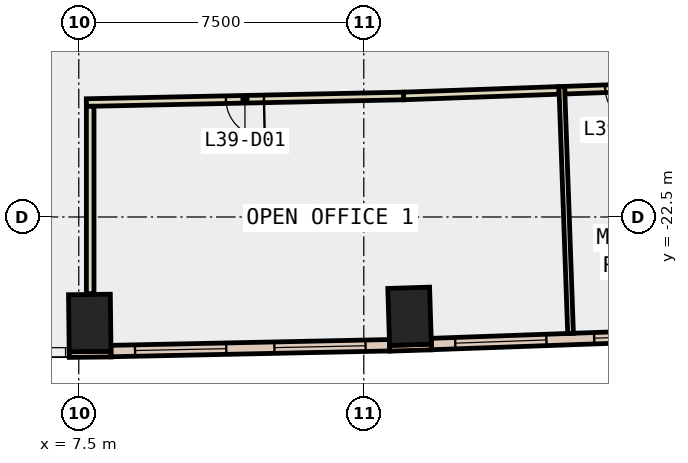
"""IFC4 building model, lengths in metres.
Left out: names, types, materials, properties, quantities, classifications, styles, units other than length and angle.
Written with IfcOpenShell. Run it as: python <this file> out.ifc"""

import sys

from ifc_helpers import new_model, si_unit, direction, frame, frame_2d, origin, origin_2d, place, context, subcontext, project, spatial, rectangle, extrude, element, fill, save


model = new_model("IFC4")
c1 = context("Model", 3, precision=1e-05, world=origin(), true_north=direction((0.0, 1.0)))
c2 = subcontext(c1, "Body", "Model", "MODEL_VIEW")
j1 = project(units=[si_unit("LENGTHUNIT", "METRE"), si_unit("PLANEANGLEUNIT", "RADIAN")], contexts=[c1])
p1 = place(None, origin())
s1 = spatial("IfcSite", under=j1, at=p1, CompositionType="ELEMENT")
p2 = place(p1, origin())
s2 = spatial("IfcBuilding", under=s1, at=p2, CompositionType="ELEMENT")
p3 = place(p2, frame((0.0, 0.0, 176.0)))
s3 = spatial("IfcBuildingStorey", under=s2, at=p3, CompositionType="ELEMENT", Elevation=176.0)
for number, where, z_axis, x_axis in (
    (1, (7.789, -25.289, -0.4), (0.0, 0.0, 1.0), (1.0, 0.012, 0.0)),
    (2, (16.205, -25.113, -0.4), (0.0, 0.0, 1.0), (0.999, 0.032, 0.0)),
):
    element("IfcColumn", number, at=place(p3, frame(where, z_axis=z_axis, x_axis=x_axis)), inside=s3, PredefinedType="COLUMN", context=c2, shape_type="SweptSolid", body=[
        extrude(rectangle(XDim=1.1, YDim=1.5, at=origin_2d()), origin(), (0.0, 0.0, 1.0), 4.2),
    ])
p4 = place(p3, frame((7.249, -26.12, 0.0), z_axis=(0.0, 0.0, 1.0), x_axis=(0.99993844157, 0.011095632951, 0.0)))
e3 = element("IfcWall", 3, at=p4, inside=s3, PredefinedType="STANDARD", context=c2, shape_type="SweptSolid", body=[
    extrude(rectangle(XDim=1.1, YDim=0.15, at=frame_2d((0.55, 0.0))), origin(), (0.0, 0.0, 1.0), 3.8),
])
p5 = place(p3, frame((15.682, -25.955, 0.0), z_axis=(0.0, 0.0, 1.0), x_axis=(0.99951682968, 0.031082264806, 0.0)))
e4 = element("IfcWall", 4, at=p5, inside=s3, PredefinedType="STANDARD", context=c2, shape_type="SweptSolid", body=[
    extrude(rectangle(XDim=1.1, YDim=0.15, at=frame_2d((0.55, 0.0))), origin(), (0.0, 0.0, 1.0), 3.8),
])
p6 = place(p3, frame((8.347, -26.028, 0.0), z_axis=(0.0, 0.0, 1.0), x_axis=(0.999782189413, 0.020870403275, 0.0)))
e5 = element("IfcWall", 5, at=p6, inside=s3, PredefinedType="STANDARD", context=c2, shape_type="SweptSolid", body=[
    extrude(rectangle(XDim=7.335, YDim=0.3, at=frame_2d((3.667, 0.0))), origin(), (0.0, 0.0, 1.0), 3.8),
])
p7 = place(p6, frame((0.634, 0.0, 0.9)))
e6 = element("IfcOpeningElement", 6, at=p7, cuts=e5, PredefinedType="OPENING", context=c2, shape_type="SweptSolid", body=[
    extrude(rectangle(XDim=2.4, YDim=2.6, at=frame_2d((1.2, 1.3))), frame((0.0, 0.16, 0.0), z_axis=(0.0, -1.0, 0.0), x_axis=(1.0, 0.0, 0.0)), (0.0, 0.0, 1.0), 0.32),
])
p8 = place(p6, frame((4.301, 0.0, 0.9)))
e7 = element("IfcOpeningElement", 7, at=p8, cuts=e5, PredefinedType="OPENING", context=c2, shape_type="SweptSolid", body=[
    extrude(rectangle(XDim=2.4, YDim=2.6, at=frame_2d((1.2, 1.3))), frame((0.0, 0.16, 0.0), z_axis=(0.0, -1.0, 0.0), x_axis=(1.0, 0.0, 0.0)), (0.0, 0.0, 1.0), 0.32),
])
p9 = place(p3, frame((16.778, -25.843, 0.0), z_axis=(0.0, 0.0, 1.0), x_axis=(0.999368368263, 0.035536805082, 0.0)))
e8 = element("IfcWall", 8, at=p9, inside=s3, PredefinedType="STANDARD", context=c2, shape_type="SweptSolid", body=[
    extrude(rectangle(XDim=7.317, YDim=0.3, at=frame_2d((3.658, 0.0))), origin(), (0.0, 0.0, 1.0), 3.8),
])
p10 = place(p9, frame((0.629, 0.0, 0.9)))
e9 = element("IfcOpeningElement", 9, at=p10, cuts=e8, PredefinedType="OPENING", context=c2, shape_type="SweptSolid", body=[
    extrude(rectangle(XDim=2.4, YDim=2.6, at=frame_2d((1.2, 1.3))), frame((0.0, 0.16, 0.0), z_axis=(0.0, -1.0, 0.0), x_axis=(1.0, 0.0, 0.0)), (0.0, 0.0, 1.0), 0.32),
])
p11 = place(p9, frame((4.287, 0.0, 0.9)))
e10 = element("IfcOpeningElement", 10, at=p11, cuts=e8, PredefinedType="OPENING", context=c2, shape_type="SweptSolid", body=[
    extrude(rectangle(XDim=2.4, YDim=2.6, at=frame_2d((1.2, 1.3))), frame((0.0, 0.16, 0.0), z_axis=(0.0, -1.0, 0.0), x_axis=(1.0, 0.0, 0.0)), (0.0, 0.0, 1.0), 0.32),
])
p12 = place(p3, frame((20.138, -19.169, 0.0), z_axis=(0.0, 0.0, 1.0), x_axis=(-0.999355925453, -0.035885014442, 0.0)))
e11 = element("IfcWall", 11, at=p12, inside=s3, PredefinedType="PARTITIONING", context=c2, shape_type="SweptSolid", body=[
    extrude(rectangle(XDim=4.096, YDim=0.2, at=frame_2d((2.048, 0.0))), origin(), (0.0, 0.0, 1.0), 3.75),
])
p13 = place(p3, frame((16.045, -19.316, 0.0), z_axis=(0.0, 0.0, 1.0), x_axis=(-0.99978251073, -0.020855005124, 0.0)))
e12 = element("IfcWall", 12, at=p13, inside=s3, PredefinedType="PARTITIONING", context=c2, shape_type="SweptSolid", body=[
    extrude(rectangle(XDim=8.347, YDim=0.2, at=frame_2d((4.173, 0.0))), origin(), (0.0, 0.0, 1.0), 3.75),
])
p14 = place(p13, frame((3.673, 0.0, 0.0)))
e13 = element("IfcOpeningElement", 13, at=p14, cuts=e12, PredefinedType="OPENING", context=c2, shape_type="SweptSolid", body=[
    extrude(rectangle(XDim=1.0, YDim=2.1, at=frame_2d((0.5, 1.05))), frame((0.0, 0.11, 0.0), z_axis=(0.0, -1.0, 0.0), x_axis=(1.0, 0.0, 0.0)), (0.0, 0.0, 1.0), 0.22),
])
p15 = place(p3, frame((23.415, -19.052, 0.0), z_axis=(0.0, 0.0, 1.0), x_axis=(-0.999358473407, -0.035813986516, 0.0)))
e14 = element("IfcWall", 14, at=p15, inside=s3, PredefinedType="PARTITIONING", context=c2, shape_type="SweptSolid", body=[
    extrude(rectangle(XDim=3.129, YDim=0.2, at=frame_2d((1.564, 0.0))), origin(), (0.0, 0.0, 1.0), 3.75),
])
p16 = place(p15, frame((1.065, 0.0, 0.0)))
e15 = element("IfcOpeningElement", 15, at=p16, cuts=e14, PredefinedType="OPENING", context=c2, shape_type="SweptSolid", body=[
    extrude(rectangle(XDim=1.0, YDim=2.1, at=frame_2d((0.5, 1.05))), frame((0.0, 0.11, 0.0), z_axis=(0.0, -1.0, 0.0), x_axis=(1.0, 0.0, 0.0)), (0.0, 0.0, 1.0), 0.22),
])
p17 = place(p3, frame((7.8, -19.588, 0.0), z_axis=(0.0, 0.0, 1.0), x_axis=(0.0, -1.0, 0.0)))
e16 = element("IfcWall", 16, at=p17, inside=s3, PredefinedType="PARTITIONING", context=c2, shape_type="SweptSolid", body=[
    extrude(rectangle(XDim=4.931, YDim=0.2, at=frame_2d((2.466, 0.0))), origin(), (0.0, 0.0, 1.0), 3.75),
])
p18 = place(p3, frame((20.21, -19.067, 0.0), z_axis=(0.0, 0.0, 1.0), x_axis=(0.035530768169, -0.999368582913, 0.0)))
e17 = element("IfcWall", 17, at=p18, inside=s3, PredefinedType="PARTITIONING", context=c2, shape_type="SweptSolid", body=[
    extrude(rectangle(XDim=6.5, YDim=0.15, at=frame_2d((3.25, 0.0))), origin(), (0.0, 0.0, 1.0), 3.75),
])
p19 = place(p7, origin())
e18 = element("IfcWindow", 18, at=p19, inside=s3, PartitioningType="SINGLE_PANEL", PredefinedType="WINDOW", context=c2, shape_type="SweptSolid", body=[
    extrude(rectangle(XDim=2.4, YDim=2.6, at=frame_2d((1.2, 1.3))), frame((0.0, 0.03, 0.0), z_axis=(0.0, -1.0, 0.0), x_axis=(1.0, 0.0, 0.0)), (0.0, 0.0, 1.0), 0.06),
])
fill(e6, e18)
p20 = place(p8, origin())
e19 = element("IfcWindow", 19, at=p20, inside=s3, PartitioningType="SINGLE_PANEL", PredefinedType="WINDOW", context=c2, shape_type="SweptSolid", body=[
    extrude(rectangle(XDim=2.4, YDim=2.6, at=frame_2d((1.2, 1.3))), frame((0.0, 0.03, 0.0), z_axis=(0.0, -1.0, 0.0), x_axis=(1.0, 0.0, 0.0)), (0.0, 0.0, 1.0), 0.06),
])
fill(e7, e19)
p21 = place(p10, origin())
e20 = element("IfcWindow", 20, at=p21, inside=s3, PartitioningType="SINGLE_PANEL", PredefinedType="WINDOW", context=c2, shape_type="SweptSolid", body=[
    extrude(rectangle(XDim=2.4, YDim=2.6, at=frame_2d((1.2, 1.3))), frame((0.0, 0.03, 0.0), z_axis=(0.0, -1.0, 0.0), x_axis=(1.0, 0.0, 0.0)), (0.0, 0.0, 1.0), 0.06),
])
fill(e9, e20)
p22 = place(p11, origin())
e21 = element("IfcWindow", 21, at=p22, inside=s3, PartitioningType="SINGLE_PANEL", PredefinedType="WINDOW", context=c2, shape_type="SweptSolid", body=[
    extrude(rectangle(XDim=2.4, YDim=2.6, at=frame_2d((1.2, 1.3))), frame((0.0, 0.03, 0.0), z_axis=(0.0, -1.0, 0.0), x_axis=(1.0, 0.0, 0.0)), (0.0, 0.0, 1.0), 0.06),
])
fill(e10, e21)
p23 = place(p14, origin())
e22 = element("IfcDoor", 22, at=p23, inside=s3, OperationType="SINGLE_SWING_RIGHT", PredefinedType="DOOR", context=c2, shape_type="SweptSolid", body=[
    extrude(rectangle(XDim=1.0, YDim=2.1, at=frame_2d((0.5, 1.05))), frame((0.0, 0.025, 0.0), z_axis=(0.0, -1.0, 0.0), x_axis=(1.0, 0.0, 0.0)), (0.0, 0.0, 1.0), 0.05),
])
fill(e13, e22)
p24 = place(p16, origin())
e23 = element("IfcDoor", 23, at=p24, inside=s3, OperationType="SINGLE_SWING_LEFT", PredefinedType="DOOR", context=c2, shape_type="SweptSolid", body=[
    extrude(rectangle(XDim=1.0, YDim=2.1, at=frame_2d((0.5, 1.05))), frame((0.0, 0.025, 0.0), z_axis=(0.0, -1.0, 0.0), x_axis=(1.0, 0.0, 0.0)), (0.0, 0.0, 1.0), 0.05),
])
fill(e15, e23)
save(model, sys.argv[1])
